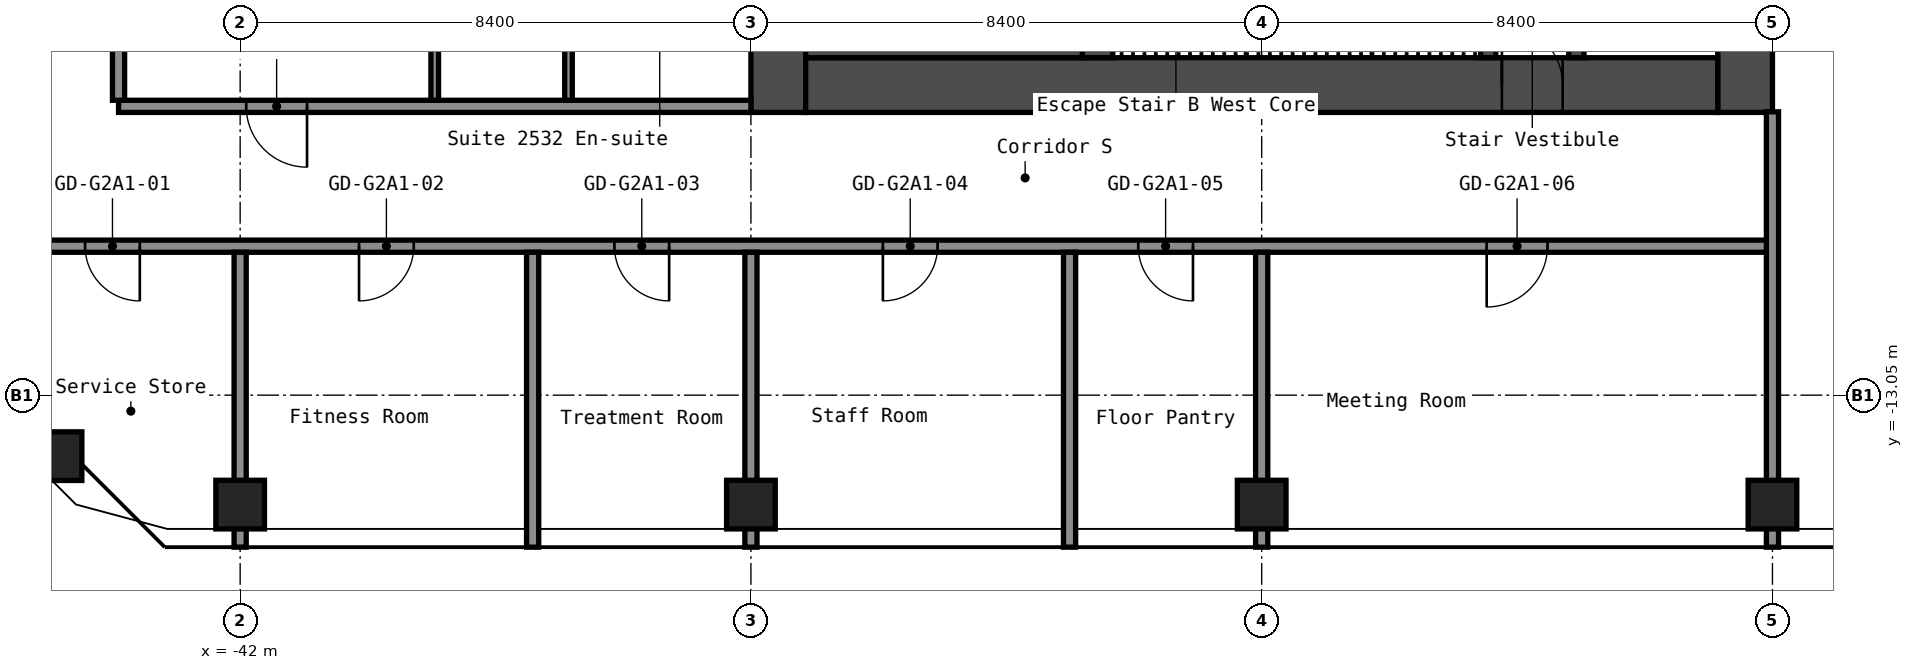
"""IFC4 building model, lengths in metres.
Left out: names, types, materials, properties, quantities, classifications, styles, units other than length and angle.
Written with IfcOpenShell. Run it as: python <this file> out.ifc"""

import sys

from ifc_helpers import new_model, si_unit, direction, frame, frame_2d, origin, origin_2d, place, context, subcontext, project, spatial, rectangle, hollow_rectangle, extrude, element, fill, save


model = new_model("IFC4")
c1 = context("Model", 3, precision=1e-05, world=origin(), true_north=direction((0.0, 1.0)))
c2 = subcontext(c1, "Body", "Model", "MODEL_VIEW")
j1 = project(units=[si_unit("LENGTHUNIT", "METRE"), si_unit("PLANEANGLEUNIT", "RADIAN")], contexts=[c1])
p1 = place(None, origin())
s1 = spatial("IfcSite", under=j1, at=p1, CompositionType="ELEMENT")
p2 = place(p1, origin())
s2 = spatial("IfcBuilding", under=s1, at=p2, CompositionType="ELEMENT")
p3 = place(p2, frame((0.0, 0.0, 91.4)))
s3 = spatial("IfcBuildingStorey", under=s2, at=p3, CompositionType="ELEMENT", Elevation=91.4)
for number, where, z_axis, x_axis in (
    (1, (-45.003, -14.053, 0.0), (0.0, 0.0, 1.0), (1.0, 0.0, 0.0)),
    (2, (-42.0, -14.85, 0.0), (0.0, 0.0, 1.0), (1.0, 0.0, 0.0)),
    (3, (-33.6, -14.85, 0.0), (0.0, 0.0, 1.0), (1.0, 0.0, 0.0)),
    (4, (-25.2, -14.85, 0.0), (0.0, 0.0, 1.0), (1.0, 0.0, 0.0)),
    (5, (-16.8, -14.85, 0.0), (0.0, 0.0, 1.0), (1.0, 0.0, 0.0)),
):
    element("IfcColumn", number, at=place(p3, frame(where, z_axis=z_axis, x_axis=x_axis)), inside=s3, PredefinedType="COLUMN", context=c2, shape_type="SweptSolid", body=[
        extrude(hollow_rectangle(XDim=0.8, YDim=0.8, WallThickness=0.032, at=origin_2d()), origin(), (0.0, 0.0, 1.0), 2.8),
    ])
p4 = place(p3, frame((-17.25, -8.4, 0.0), z_axis=(0.0, 0.0, 1.0), x_axis=(0.0, 1.0, 0.0)))
e6 = element("IfcWall", 6, at=p4, inside=s3, PredefinedType="SHEAR", context=c2, shape_type="SweptSolid", body=[
    extrude(rectangle(XDim=16.8, YDim=0.9, at=frame_2d((8.4, 0.0))), origin(), (0.0, 0.0, 1.0), 2.8),
])
p5 = place(p4, frame((7.6, 0.0, 0.0)))
e7 = element("IfcOpeningElement", 7, at=p5, cuts=e6, PredefinedType="OPENING", context=c2, shape_type="SweptSolid", body=[
    extrude(rectangle(XDim=1.2, YDim=2.1, at=frame_2d((0.6, 1.05))), frame((0.0, 0.46, 0.0), z_axis=(0.0, -1.0, 0.0), x_axis=(1.0, 0.0, 0.0)), (0.0, 0.0, 1.0), 0.92),
])
p6 = place(p3, frame((-33.15, -8.4, 0.0), z_axis=(0.0, 0.0, 1.0), x_axis=(0.0, 1.0, 0.0)))
e8 = element("IfcWall", 8, at=p6, inside=s3, PredefinedType="SHEAR", context=c2, shape_type="SweptSolid", body=[
    extrude(rectangle(XDim=16.8, YDim=0.9, at=frame_2d((8.4, 0.0))), origin(), (0.0, 0.0, 1.0), 2.8),
])
p7 = place(p3, frame((-32.7, -7.95, 0.0), z_axis=(0.0, 0.0, 1.0), x_axis=(1.0, 0.0, 0.0)))
e9 = element("IfcWall", 9, at=p7, inside=s3, PredefinedType="SHEAR", context=c2, shape_type="SweptSolid", body=[
    extrude(rectangle(XDim=15.0, YDim=0.9, at=frame_2d((7.5, 0.0))), origin(), (0.0, 0.0, 1.0), 2.8),
])
p8 = place(p7, frame((11.45, 0.0, 0.0)))
e10 = element("IfcOpeningElement", 10, at=p8, cuts=e9, PredefinedType="OPENING", context=c2, shape_type="SweptSolid", body=[
    extrude(rectangle(XDim=1.0, YDim=2.1, at=frame_2d((0.5, 1.05))), frame((0.0, 0.46, 0.0), z_axis=(0.0, -1.0, 0.0), x_axis=(1.0, 0.0, 0.0)), (0.0, 0.0, 1.0), 0.92),
])
p9 = place(p3, frame((-20.025, -7.5, 0.0), z_axis=(0.0, 0.0, 1.0), x_axis=(0.0, 1.0, 0.0)))
e11 = element("IfcWall", 11, at=p9, inside=s3, PredefinedType="SHEAR", context=c2, shape_type="SweptSolid", body=[
    extrude(rectangle(XDim=6.3, YDim=0.25, at=frame_2d((3.15, 0.0))), origin(), (0.0, 0.0, 1.0), 2.8),
])
p10 = place(p9, frame((2.4, 0.0, 0.0)))
e12 = element("IfcOpeningElement", 12, at=p10, cuts=e11, PredefinedType="OPENING", context=c2, shape_type="SweptSolid", body=[
    extrude(rectangle(XDim=1.0, YDim=2.1, at=frame_2d((0.5, 1.05))), frame((0.0, 0.135, 0.0), z_axis=(0.0, -1.0, 0.0), x_axis=(1.0, 0.0, 0.0)), (0.0, 0.0, 1.0), 0.27),
])
p11 = place(p3, frame((-21.475, -7.5, 0.0), z_axis=(0.0, 0.0, 1.0), x_axis=(0.0, 1.0, 0.0)))
e13 = element("IfcWall", 13, at=p11, inside=s3, PredefinedType="SHEAR", context=c2, shape_type="SweptSolid", body=[
    extrude(rectangle(XDim=3.75, YDim=0.25, at=frame_2d((1.875, 0.0))), origin(), (0.0, 0.0, 1.0), 2.8),
])
p12 = place(p11, frame((1.3, 0.0, 0.0)))
e14 = element("IfcOpeningElement", 14, at=p12, cuts=e13, PredefinedType="OPENING", context=c2, shape_type="SweptSolid", body=[
    extrude(rectangle(XDim=1.2, YDim=2.1, at=frame_2d((0.6, 1.05))), frame((0.0, 0.135, 0.0), z_axis=(0.0, -1.0, 0.0), x_axis=(1.0, 0.0, 0.0)), (0.0, 0.0, 1.0), 0.27),
])
p13 = place(p3, frame((-27.9, -7.5, 0.0), z_axis=(0.0, 0.0, 1.0), x_axis=(0.0, 1.0, 0.0)))
e15 = element("IfcWall", 15, at=p13, inside=s3, PredefinedType="SHEAR", context=c2, shape_type="SweptSolid", body=[
    extrude(rectangle(XDim=3.75, YDim=0.5, at=frame_2d((1.875, 0.0))), origin(), (0.0, 0.0, 1.0), 2.8),
])
p14 = place(p3, frame((-32.7, -6.75, 0.0), z_axis=(0.0, 0.0, 1.0), x_axis=(1.0, 0.0, 0.0)))
e16 = element("IfcWall", 16, at=p14, inside=s3, PredefinedType="SHEAR", context=c2, shape_type="SweptSolid", body=[
    extrude(rectangle(XDim=4.55, YDim=1.5, at=frame_2d((2.275, 0.0))), origin(), (0.0, 0.0, 1.0), 2.8),
])
p15 = place(p3, frame((-46.5, -10.6, 0.0), z_axis=(0.0, 0.0, 1.0), x_axis=(1.0, 0.0, 0.0)))
e17 = element("IfcWall", 17, at=p15, inside=s3, PredefinedType="PARTITIONING", context=c2, shape_type="SweptSolid", body=[
    extrude(rectangle(XDim=29.7, YDim=0.2, at=frame_2d((14.85, 0.0))), origin(), (0.0, 0.0, 1.0), 2.8),
])
p16 = place(p15, frame((1.95, 0.0, 0.0)))
e18 = element("IfcOpeningElement", 18, at=p16, cuts=e17, PredefinedType="OPENING", context=c2, shape_type="SweptSolid", body=[
    extrude(rectangle(XDim=0.9, YDim=2.1, at=frame_2d((0.45, 1.05))), frame((0.0, 0.11, 0.0), z_axis=(0.0, -1.0, 0.0), x_axis=(1.0, 0.0, 0.0)), (0.0, 0.0, 1.0), 0.22),
])
p17 = place(p15, frame((6.455, 0.0, 0.0)))
e19 = element("IfcOpeningElement", 19, at=p17, cuts=e17, PredefinedType="OPENING", context=c2, shape_type="SweptSolid", body=[
    extrude(rectangle(XDim=0.9, YDim=2.1, at=frame_2d((0.45, 1.05))), frame((0.0, 0.11, 0.0), z_axis=(0.0, -1.0, 0.0), x_axis=(1.0, 0.0, 0.0)), (0.0, 0.0, 1.0), 0.22),
])
p18 = place(p15, frame((10.655, 0.0, 0.0)))
e20 = element("IfcOpeningElement", 20, at=p18, cuts=e17, PredefinedType="OPENING", context=c2, shape_type="SweptSolid", body=[
    extrude(rectangle(XDim=0.9, YDim=2.1, at=frame_2d((0.45, 1.05))), frame((0.0, 0.11, 0.0), z_axis=(0.0, -1.0, 0.0), x_axis=(1.0, 0.0, 0.0)), (0.0, 0.0, 1.0), 0.22),
])
p19 = place(p15, frame((15.07, 0.0, 0.0)))
e21 = element("IfcOpeningElement", 21, at=p19, cuts=e17, PredefinedType="OPENING", context=c2, shape_type="SweptSolid", body=[
    extrude(rectangle(XDim=0.9, YDim=2.1, at=frame_2d((0.45, 1.05))), frame((0.0, 0.11, 0.0), z_axis=(0.0, -1.0, 0.0), x_axis=(1.0, 0.0, 0.0)), (0.0, 0.0, 1.0), 0.22),
])
p20 = place(p15, frame((19.27, 0.0, 0.0)))
e22 = element("IfcOpeningElement", 22, at=p20, cuts=e17, PredefinedType="OPENING", context=c2, shape_type="SweptSolid", body=[
    extrude(rectangle(XDim=0.9, YDim=2.1, at=frame_2d((0.45, 1.05))), frame((0.0, 0.11, 0.0), z_axis=(0.0, -1.0, 0.0), x_axis=(1.0, 0.0, 0.0)), (0.0, 0.0, 1.0), 0.22),
])
p21 = place(p15, frame((25.0, 0.0, 0.0)))
e23 = element("IfcOpeningElement", 23, at=p21, cuts=e17, PredefinedType="OPENING", context=c2, shape_type="SweptSolid", body=[
    extrude(rectangle(XDim=1.0, YDim=2.1, at=frame_2d((0.5, 1.05))), frame((0.0, 0.11, 0.0), z_axis=(0.0, -1.0, 0.0), x_axis=(1.0, 0.0, 0.0)), (0.0, 0.0, 1.0), 0.22),
])
p22 = place(p3, frame((-44.0, -8.3, 0.0), z_axis=(0.0, 0.0, 1.0), x_axis=(1.0, 0.0, 0.0)))
e24 = element("IfcWall", 24, at=p22, inside=s3, PredefinedType="PARTITIONING", context=c2, shape_type="SweptSolid", body=[
    extrude(rectangle(XDim=10.4, YDim=0.2, at=frame_2d((5.2, 0.0))), origin(), (0.0, 0.0, 1.0), 2.8),
])
p23 = place(p22, frame((2.1, 0.0, 0.0)))
e25 = element("IfcOpeningElement", 25, at=p23, cuts=e24, PredefinedType="OPENING", context=c2, shape_type="SweptSolid", body=[
    extrude(rectangle(XDim=1.0, YDim=2.1, at=frame_2d((0.5, 1.05))), frame((0.0, 0.11, 0.0), z_axis=(0.0, -1.0, 0.0), x_axis=(1.0, 0.0, 0.0)), (0.0, 0.0, 1.0), 0.22),
])
p24 = place(p3, frame((-44.0, -8.2, 0.0), z_axis=(0.0, 0.0, 1.0), x_axis=(0.0, 1.0, 0.0)))
e26 = element("IfcWall", 26, at=p24, inside=s3, PredefinedType="PARTITIONING", context=c2, shape_type="SweptSolid", body=[
    extrude(rectangle(XDim=16.4, YDim=0.2, at=frame_2d((8.2, 0.0))), origin(), (0.0, 0.0, 1.0), 2.8),
])
p25 = place(p3, frame((-42.0, -15.55, 0.0), z_axis=(0.0, 0.0, 1.0), x_axis=(0.0, 1.0, 0.0)))
e27 = element("IfcWall", 27, at=p25, inside=s3, PredefinedType="PARTITIONING", context=c2, shape_type="SweptSolid", body=[
    extrude(rectangle(XDim=4.85, YDim=0.2, at=frame_2d((2.425, 0.0))), origin(), (0.0, 0.0, 1.0), 2.8),
])
p26 = place(p3, frame((-38.8, -8.2, 0.0), z_axis=(0.0, 0.0, 1.0), x_axis=(0.0, 1.0, 0.0)))
e28 = element("IfcWall", 28, at=p26, inside=s3, PredefinedType="PARTITIONING", context=c2, shape_type="SweptSolid", body=[
    extrude(rectangle(XDim=8.1, YDim=0.125, at=frame_2d((4.05, 0.0))), origin(), (0.0, 0.0, 1.0), 2.8),
])
p27 = place(p26, frame((4.05, 0.0, 0.0)))
e29 = element("IfcOpeningElement", 29, at=p27, cuts=e28, PredefinedType="OPENING", context=c2, shape_type="SweptSolid", body=[
    extrude(rectangle(XDim=0.9, YDim=2.1, at=frame_2d((0.45, 1.05))), frame((0.0, 0.073, 0.0), z_axis=(0.0, -1.0, 0.0), x_axis=(1.0, 0.0, 0.0)), (0.0, 0.0, 1.0), 0.145),
])
p28 = place(p3, frame((-37.19, -15.55, 0.0), z_axis=(0.0, 0.0, 1.0), x_axis=(0.0, 1.0, 0.0)))
e30 = element("IfcWall", 30, at=p28, inside=s3, PredefinedType="PARTITIONING", context=c2, shape_type="SweptSolid", body=[
    extrude(rectangle(XDim=4.85, YDim=0.2, at=frame_2d((2.425, 0.0))), origin(), (0.0, 0.0, 1.0), 2.8),
])
p29 = place(p3, frame((-36.6, -8.2, 0.0), z_axis=(0.0, 0.0, 1.0), x_axis=(0.0, 1.0, 0.0)))
e31 = element("IfcWall", 31, at=p29, inside=s3, PredefinedType="PARTITIONING", context=c2, shape_type="SweptSolid", body=[
    extrude(rectangle(XDim=3.1, YDim=0.125, at=frame_2d((1.55, 0.0))), origin(), (0.0, 0.0, 1.0), 2.8),
])
for number, where, z_axis, x_axis in (
    (32, (-33.6, -15.55, 0.0), (0.0, 0.0, 1.0), (0.0, 1.0, 0.0)),
    (33, (-28.36, -15.55, 0.0), (0.0, 0.0, 1.0), (0.0, 1.0, 0.0)),
    (34, (-25.2, -15.55, 0.0), (0.0, 0.0, 1.0), (0.0, 1.0, 0.0)),
):
    element("IfcWall", number, at=place(p3, frame(where, z_axis=z_axis, x_axis=x_axis)), inside=s3, PredefinedType="PARTITIONING", context=c2, shape_type="SweptSolid", body=[
        extrude(rectangle(XDim=4.85, YDim=0.2, at=frame_2d((2.425, 0.0))), origin(), (0.0, 0.0, 1.0), 2.8),
    ])
p30 = place(p3, frame((-16.8, -15.55, 0.0), z_axis=(0.0, 0.0, 1.0), x_axis=(0.0, 1.0, 0.0)))
e35 = element("IfcWall", 35, at=p30, inside=s3, PredefinedType="PARTITIONING", context=c2, shape_type="SweptSolid", body=[
    extrude(rectangle(XDim=7.16, YDim=0.2, at=frame_2d((3.58, 0.0))), origin(), (0.0, 0.0, 1.0), 2.8),
])
p31 = place(p8, origin())
e36 = element("IfcDoor", 36, at=p31, inside=s3, OperationType="SINGLE_SWING_RIGHT", PredefinedType="DOOR", context=c2, shape_type="SweptSolid", body=[
    extrude(rectangle(XDim=1.0, YDim=2.1, at=frame_2d((0.5, 1.05))), frame((0.0, 0.025, 0.0), z_axis=(0.0, -1.0, 0.0), x_axis=(1.0, 0.0, 0.0)), (0.0, 0.0, 1.0), 0.05),
])
fill(e10, e36)
p32 = place(p16, origin())
e37 = element("IfcDoor", 37, at=p32, inside=s3, OperationType="SINGLE_SWING_RIGHT", PredefinedType="DOOR", context=c2, shape_type="SweptSolid", body=[
    extrude(rectangle(XDim=0.9, YDim=2.1, at=frame_2d((0.45, 1.05))), frame((0.0, 0.025, 0.0), z_axis=(0.0, -1.0, 0.0), x_axis=(1.0, 0.0, 0.0)), (0.0, 0.0, 1.0), 0.05),
])
fill(e18, e37)
p33 = place(p17, origin())
e38 = element("IfcDoor", 38, at=p33, inside=s3, OperationType="SINGLE_SWING_LEFT", PredefinedType="DOOR", context=c2, shape_type="SweptSolid", body=[
    extrude(rectangle(XDim=0.9, YDim=2.1, at=frame_2d((0.45, 1.05))), frame((0.0, 0.025, 0.0), z_axis=(0.0, -1.0, 0.0), x_axis=(1.0, 0.0, 0.0)), (0.0, 0.0, 1.0), 0.05),
])
fill(e19, e38)
p34 = place(p18, origin())
e39 = element("IfcDoor", 39, at=p34, inside=s3, OperationType="SINGLE_SWING_RIGHT", PredefinedType="DOOR", context=c2, shape_type="SweptSolid", body=[
    extrude(rectangle(XDim=0.9, YDim=2.1, at=frame_2d((0.45, 1.05))), frame((0.0, 0.025, 0.0), z_axis=(0.0, -1.0, 0.0), x_axis=(1.0, 0.0, 0.0)), (0.0, 0.0, 1.0), 0.05),
])
fill(e20, e39)
p35 = place(p19, origin())
e40 = element("IfcDoor", 40, at=p35, inside=s3, OperationType="SINGLE_SWING_LEFT", PredefinedType="DOOR", context=c2, shape_type="SweptSolid", body=[
    extrude(rectangle(XDim=0.9, YDim=2.1, at=frame_2d((0.45, 1.05))), frame((0.0, 0.025, 0.0), z_axis=(0.0, -1.0, 0.0), x_axis=(1.0, 0.0, 0.0)), (0.0, 0.0, 1.0), 0.05),
])
fill(e21, e40)
p36 = place(p20, origin())
e41 = element("IfcDoor", 41, at=p36, inside=s3, OperationType="SINGLE_SWING_RIGHT", PredefinedType="DOOR", context=c2, shape_type="SweptSolid", body=[
    extrude(rectangle(XDim=0.9, YDim=2.1, at=frame_2d((0.45, 1.05))), frame((0.0, 0.025, 0.0), z_axis=(0.0, -1.0, 0.0), x_axis=(1.0, 0.0, 0.0)), (0.0, 0.0, 1.0), 0.05),
])
fill(e22, e41)
p37 = place(p21, origin())
e42 = element("IfcDoor", 42, at=p37, inside=s3, OperationType="SINGLE_SWING_LEFT", PredefinedType="DOOR", context=c2, shape_type="SweptSolid", body=[
    extrude(rectangle(XDim=1.0, YDim=2.1, at=frame_2d((0.5, 1.05))), frame((0.0, 0.025, 0.0), z_axis=(0.0, -1.0, 0.0), x_axis=(1.0, 0.0, 0.0)), (0.0, 0.0, 1.0), 0.05),
])
fill(e23, e42)
p38 = place(p23, origin())
e43 = element("IfcDoor", 43, at=p38, inside=s3, OperationType="SINGLE_SWING_RIGHT", PredefinedType="DOOR", context=c2, shape_type="SweptSolid", body=[
    extrude(rectangle(XDim=1.0, YDim=2.1, at=frame_2d((0.5, 1.05))), frame((0.0, 0.025, 0.0), z_axis=(0.0, -1.0, 0.0), x_axis=(1.0, 0.0, 0.0)), (0.0, 0.0, 1.0), 0.05),
])
fill(e25, e43)
save(model, sys.argv[1])
